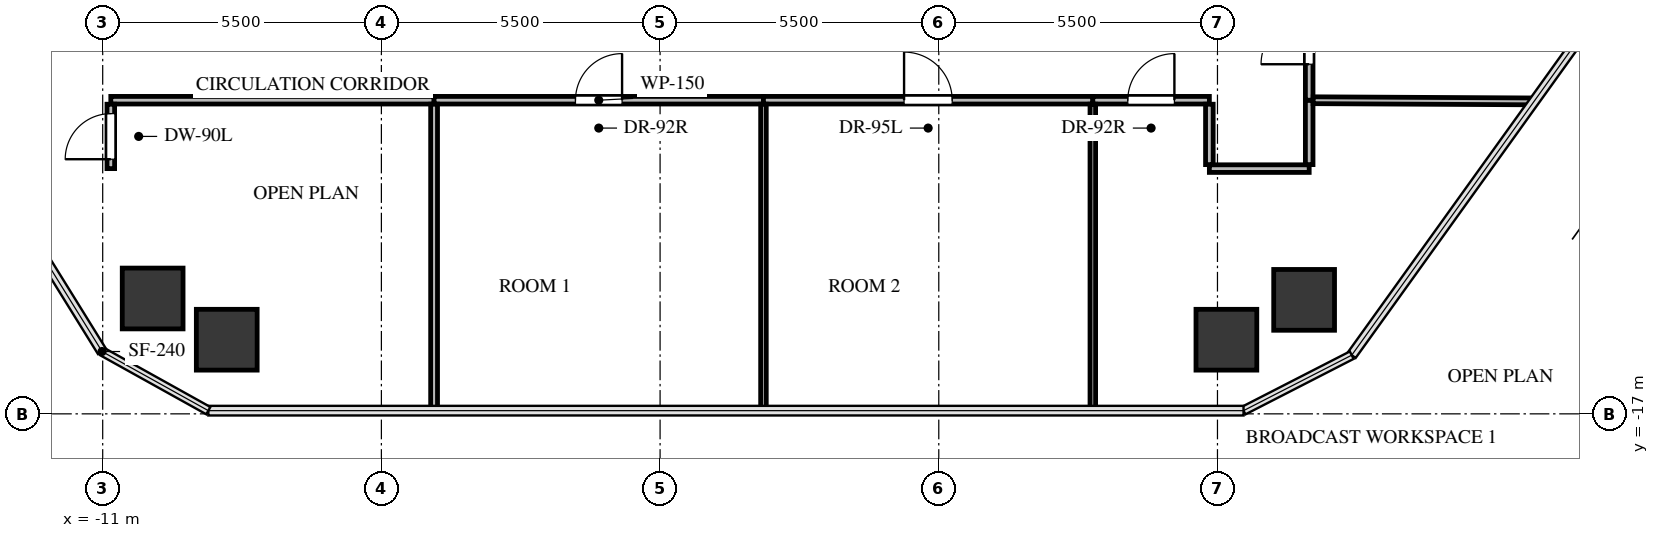
"""IFC4 building model, lengths in metres.
Left out: names, types, materials, properties, quantities, classifications, styles, units other than length and angle.
Written with IfcOpenShell. Run it as: python <this file> out.ifc"""

import sys

from ifc_helpers import new_model, si_unit, direction, frame, frame_2d, origin, origin_2d, place, context, subcontext, project, spatial, rectangle, extrude, source, transform, mapped, element, fill, save


model = new_model("IFC4")
c1 = context("Model", 3, precision=1e-05, world=origin(), true_north=direction((0.0, 1.0)))
c2 = subcontext(c1, "Body", "Model", "MODEL_VIEW")
j1 = project(units=[si_unit("LENGTHUNIT", "METRE"), si_unit("PLANEANGLEUNIT", "RADIAN")], contexts=[c1])
p1 = place(None, origin())
s1 = spatial("IfcSite", under=j1, at=p1, CompositionType="ELEMENT")
p2 = place(p1, origin())
s2 = spatial("IfcBuilding", under=s1, at=p2, CompositionType="ELEMENT")
p3 = place(p2, frame((0.0, 0.0, 117.3)))
s3 = spatial("IfcBuildingStorey", under=s2, at=p3, CompositionType="ELEMENT", Elevation=117.3)
m1 = source(origin(), c2, "Body", "SweptSolid", [
    extrude(rectangle(XDim=1.2, YDim=1.2, at=origin_2d()), origin(), (0.0, 0.0, 1.0), 3.3),
])
for number, where, z_axis, x_axis in (
    (1, (-10.014, -14.723, -0.24), (0.0, 0.0, 1.0), (1.0, 0.0, 0.0)),
    (2, (12.71, -14.75, -0.24), (0.0, 0.0, 1.0), (1.0, 0.0, 0.0)),
    (3, (11.176, -15.537, -0.24), (0.0, 0.0, 1.0), (1.0, 0.0, 0.0)),
    (4, (-8.552, -15.537, -0.24), (0.0, 0.0, 1.0), (1.0, 0.0, 0.0)),
):
    element("IfcColumn", number, at=place(p3, frame(where, z_axis=z_axis, x_axis=x_axis)), inside=s3, PredefinedType="COLUMN", context=c2, shape_type="MappedRepresentation", body=[
        mapped(m1, transform((0.0, 0.0, 0.0), x_axis=(1.0, 0.0, 0.0), y_axis=(0.0, 1.0, 0.0), z_axis=(0.0, 0.0, 1.0), scale=1.0)),
    ])
p4 = place(p3, frame((-10.84, -10.81, 0.0), z_axis=(0.0, 0.0, 1.0), x_axis=(1.0, 0.0, 0.0)))
e5 = element("IfcWall", 5, at=p4, inside=s3, PredefinedType="PARTITIONING", context=c2, shape_type="SweptSolid", body=[
    extrude(rectangle(XDim=6.38, YDim=0.15, at=frame_2d((3.19, 0.0))), origin(), (0.0, 0.0, 1.0), 2.212),
])
p5 = place(p3, frame((-10.84, -12.16, 0.0), z_axis=(0.0, 0.0, 1.0), x_axis=(0.0, 1.0, 0.0)))
e6 = element("IfcWall", 6, at=p5, inside=s3, PredefinedType="PARTITIONING", context=c2, shape_type="SweptSolid", body=[
    extrude(rectangle(XDim=1.271, YDim=0.15, at=frame_2d((0.635, 0.0))), origin(), (0.0, 0.0, 1.0), 3.045),
])
p6 = place(p5, frame((0.186, 0.0, 0.0)))
e7 = element("IfcOpeningElement", 7, at=p6, cuts=e6, PredefinedType="OPENING", context=c2, shape_type="SweptSolid", body=[
    extrude(rectangle(XDim=0.9, YDim=2.05, at=frame_2d((0.45, 1.025))), frame((0.0, 0.085, 0.0), z_axis=(0.0, -1.0, 0.0), x_axis=(1.0, 0.0, 0.0)), (0.0, 0.0, 1.0), 0.17),
])
p7 = place(p3, frame((-4.46, -10.81, 0.0), z_axis=(0.0, 0.0, 1.0), x_axis=(1.0, 0.0, 0.0)))
e8 = element("IfcWall", 8, at=p7, inside=s3, PredefinedType="PARTITIONING", context=c2, shape_type="SweptSolid", body=[
    extrude(rectangle(XDim=6.5, YDim=0.15, at=frame_2d((3.25, 0.0))), origin(), (0.0, 0.0, 1.0), 3.045),
])
p8 = place(p7, frame((2.79, 0.0, 0.0)))
e9 = element("IfcOpeningElement", 9, at=p8, cuts=e8, PredefinedType="OPENING", context=c2, shape_type="SweptSolid", body=[
    extrude(rectangle(XDim=0.92, YDim=2.1, at=frame_2d((0.46, 1.05))), frame((0.0, 0.085, 0.0), z_axis=(0.0, -1.0, 0.0), x_axis=(1.0, 0.0, 0.0)), (0.0, 0.0, 1.0), 0.17),
])
p9 = place(p3, frame((2.04, -10.81, 0.0), z_axis=(0.0, 0.0, 1.0), x_axis=(1.0, 0.0, 0.0)))
e10 = element("IfcWall", 10, at=p9, inside=s3, PredefinedType="PARTITIONING", context=c2, shape_type="SweptSolid", body=[
    extrude(rectangle(XDim=6.5, YDim=0.15, at=frame_2d((3.25, 0.0))), origin(), (0.0, 0.0, 1.0), 2.212),
])
p10 = place(p9, frame((2.775, 0.0, 0.0)))
e11 = element("IfcOpeningElement", 11, at=p10, cuts=e10, PredefinedType="OPENING", context=c2, shape_type="SweptSolid", body=[
    extrude(rectangle(XDim=0.95, YDim=2.1, at=frame_2d((0.475, 1.05))), frame((0.0, 0.085, 0.0), z_axis=(0.0, -1.0, 0.0), x_axis=(1.0, 0.0, 0.0)), (0.0, 0.0, 1.0), 0.17),
])
p11 = place(p3, frame((8.54, -10.81, 0.0), z_axis=(0.0, 0.0, 1.0), x_axis=(1.0, 0.0, 0.0)))
e12 = element("IfcWall", 12, at=p11, inside=s3, PredefinedType="PARTITIONING", context=c2, shape_type="SweptSolid", body=[
    extrude(rectangle(XDim=2.3, YDim=0.15, at=frame_2d((1.15, 0.0))), origin(), (0.0, 0.0, 1.0), 3.045),
])
p12 = place(p11, frame((0.69, 0.0, 0.0)))
e13 = element("IfcOpeningElement", 13, at=p12, cuts=e12, PredefinedType="OPENING", context=c2, shape_type="SweptSolid", body=[
    extrude(rectangle(XDim=0.92, YDim=2.1, at=frame_2d((0.46, 1.05))), frame((0.0, 0.085, 0.0), z_axis=(0.0, -1.0, 0.0), x_axis=(1.0, 0.0, 0.0)), (0.0, 0.0, 1.0), 0.17),
])
p13 = place(p3, frame((10.84, -12.16, 0.0), z_axis=(0.0, 0.0, 1.0), x_axis=(1.0, 0.0, 0.0)))
e14 = element("IfcWall", 14, at=p13, inside=s3, PredefinedType="PARTITIONING", context=c2, shape_type="SweptSolid", body=[
    extrude(rectangle(XDim=1.97, YDim=0.15, at=frame_2d((0.985, 0.0))), origin(), (0.0, 0.0, 1.0), 3.045),
])
p14 = place(p3, frame((10.84, -10.889, 0.0), z_axis=(0.0, 0.0, 1.0), x_axis=(0.0, -1.0, 0.0)))
e15 = element("IfcWall", 15, at=p14, inside=s3, PredefinedType="PARTITIONING", context=c2, shape_type="SweptSolid", body=[
    extrude(rectangle(XDim=1.192, YDim=0.15, at=frame_2d((0.596, 0.0))), origin(), (0.0, 0.0, 1.0), 3.045),
])
p15 = place(p3, frame((12.81, -12.081, 0.0), z_axis=(0.0, 0.0, 1.0), x_axis=(0.0, 1.0, 0.0)))
e16 = element("IfcWall", 16, at=p15, inside=s3, PredefinedType="PARTITIONING", context=c2, shape_type="SweptSolid", body=[
    extrude(rectangle(XDim=1.271, YDim=0.15, at=frame_2d((0.635, 0.0))), origin(), (0.0, 0.0, 1.0), 3.045),
])
p16 = place(p3, frame((12.81, -10.81, 0.0), z_axis=(0.0, 0.0, 1.0), x_axis=(0.0, 1.0, 0.0)))
e17 = element("IfcWall", 17, at=p16, inside=s3, PredefinedType="PARTITIONING", context=c2, shape_type="SweptSolid", body=[
    extrude(rectangle(XDim=2.37, YDim=0.15, at=frame_2d((1.185, 0.0))), origin(), (0.0, 0.0, 1.0), 3.045),
])
p17 = place(p16, frame((0.71, 0.0, 0.0)))
e18 = element("IfcOpeningElement", 18, at=p17, cuts=e17, PredefinedType="OPENING", context=c2, shape_type="SweptSolid", body=[
    extrude(rectangle(XDim=0.95, YDim=2.1, at=frame_2d((0.475, 1.05))), frame((0.0, 0.085, 0.0), z_axis=(0.0, -1.0, 0.0), x_axis=(1.0, 0.0, 0.0)), (0.0, 0.0, 1.0), 0.17),
])
p18 = place(p3, frame((-4.46, -10.889, 0.0), z_axis=(0.0, 0.0, 1.0), x_axis=(0.0, -1.0, 0.0)))
e19 = element("IfcWall", 19, at=p18, inside=s3, PredefinedType="PARTITIONING", context=c2, shape_type="SweptSolid", body=[
    extrude(rectangle(XDim=6.048, YDim=0.135, at=frame_2d((3.024, 0.0))), origin(), (0.0, 0.0, 1.0), 2.38),
])
p19 = place(p3, frame((2.04, -10.889, 0.0), z_axis=(0.0, 0.0, 1.0), x_axis=(0.0, -1.0, 0.0)))
e20 = element("IfcWall", 20, at=p19, inside=s3, PredefinedType="MOVABLE", context=c2, shape_type="SweptSolid", body=[
    extrude(rectangle(XDim=6.048, YDim=0.11, at=frame_2d((3.024, 0.0))), origin(), (0.0, 0.0, 1.0), 2.38),
])
p20 = place(p3, frame((8.54, -10.889, 0.0), z_axis=(0.0, 0.0, 1.0), x_axis=(0.0, -1.0, 0.0)))
e21 = element("IfcWall", 21, at=p20, inside=s3, PredefinedType="MOVABLE", context=c2, shape_type="SweptSolid", body=[
    extrude(rectangle(XDim=6.048, YDim=0.11, at=frame_2d((3.024, 0.0))), origin(), (0.0, 0.0, 1.0), 2.212),
])
p21 = place(p3, frame((12.889, -10.81, 0.0), z_axis=(0.0, 0.0, 1.0), x_axis=(0.999986140562, -0.005264853658, 0.0)))
e22 = element("IfcWall", 22, at=p21, inside=s3, PredefinedType="PARTITIONING", context=c2, shape_type="SweptSolid", body=[
    extrude(rectangle(XDim=4.359, YDim=0.135, at=frame_2d((2.179, 0.0))), origin(), (0.0, 0.0, 1.0), 2.38),
])
m2 = source(origin(), c2, "Body", "SweptSolid", [
    extrude(rectangle(XDim=0.9, YDim=2.05, at=frame_2d((0.45, 1.025))), frame((0.0, 0.025, 0.0), z_axis=(0.0, -1.0, 0.0), x_axis=(1.0, 0.0, 0.0)), (0.0, 0.0, 1.0), 0.05),
])
p22 = place(p6, origin())
e23 = element("IfcDoor", 23, at=p22, inside=s3, OperationType="SINGLE_SWING_LEFT", PredefinedType="DOOR", context=c2, shape_type="MappedRepresentation", body=[
    mapped(m2, transform((0.0, 0.0, 0.0), x_axis=(1.0, 0.0, 0.0), y_axis=(0.0, 1.0, 0.0), z_axis=(0.0, 0.0, 1.0), scale=1.0)),
])
fill(e7, e23)
m3 = source(origin(), c2, "Body", "SweptSolid", [
    extrude(rectangle(XDim=0.92, YDim=2.1, at=frame_2d((0.46, 1.05))), frame((0.0, 0.025, 0.0), z_axis=(0.0, -1.0, 0.0), x_axis=(1.0, 0.0, 0.0)), (0.0, 0.0, 1.0), 0.05),
])
p23 = place(p8, origin())
e24 = element("IfcDoor", 24, at=p23, inside=s3, OperationType="SINGLE_SWING_RIGHT", PredefinedType="DOOR", context=c2, shape_type="MappedRepresentation", body=[
    mapped(m3, transform((0.0, 0.0, 0.0), x_axis=(1.0, 0.0, 0.0), y_axis=(0.0, 1.0, 0.0), z_axis=(0.0, 0.0, 1.0), scale=1.0)),
])
fill(e9, e24)
m4 = source(origin(), c2, "Body", "SweptSolid", [
    extrude(rectangle(XDim=0.95, YDim=2.1, at=frame_2d((0.475, 1.05))), frame((0.0, 0.025, 0.0), z_axis=(0.0, -1.0, 0.0), x_axis=(1.0, 0.0, 0.0)), (0.0, 0.0, 1.0), 0.05),
])
p24 = place(p10, origin())
e25 = element("IfcDoor", 25, at=p24, inside=s3, OperationType="SINGLE_SWING_LEFT", PredefinedType="DOOR", context=c2, shape_type="MappedRepresentation", body=[
    mapped(m4, transform((0.0, 0.0, 0.0), x_axis=(1.0, 0.0, 0.0), y_axis=(0.0, 1.0, 0.0), z_axis=(0.0, 0.0, 1.0), scale=1.0)),
])
fill(e11, e25)
p25 = place(p12, origin())
e26 = element("IfcDoor", 26, at=p25, inside=s3, OperationType="SINGLE_SWING_RIGHT", PredefinedType="DOOR", context=c2, shape_type="MappedRepresentation", body=[
    mapped(m3, transform((0.0, 0.0, 0.0), x_axis=(1.0, 0.0, 0.0), y_axis=(0.0, 1.0, 0.0), z_axis=(0.0, 0.0, 1.0), scale=1.0)),
])
fill(e13, e26)
p26 = place(p17, origin())
e27 = element("IfcDoor", 27, at=p26, inside=s3, OperationType="SINGLE_SWING_LEFT", PredefinedType="DOOR", context=c2, shape_type="MappedRepresentation", body=[
    mapped(m4, transform((0.0, 0.0, 0.0), x_axis=(1.0, 0.0, 0.0), y_axis=(0.0, 1.0, 0.0), z_axis=(0.0, 0.0, 1.0), scale=1.0)),
])
fill(e18, e27)
save(model, sys.argv[1])
